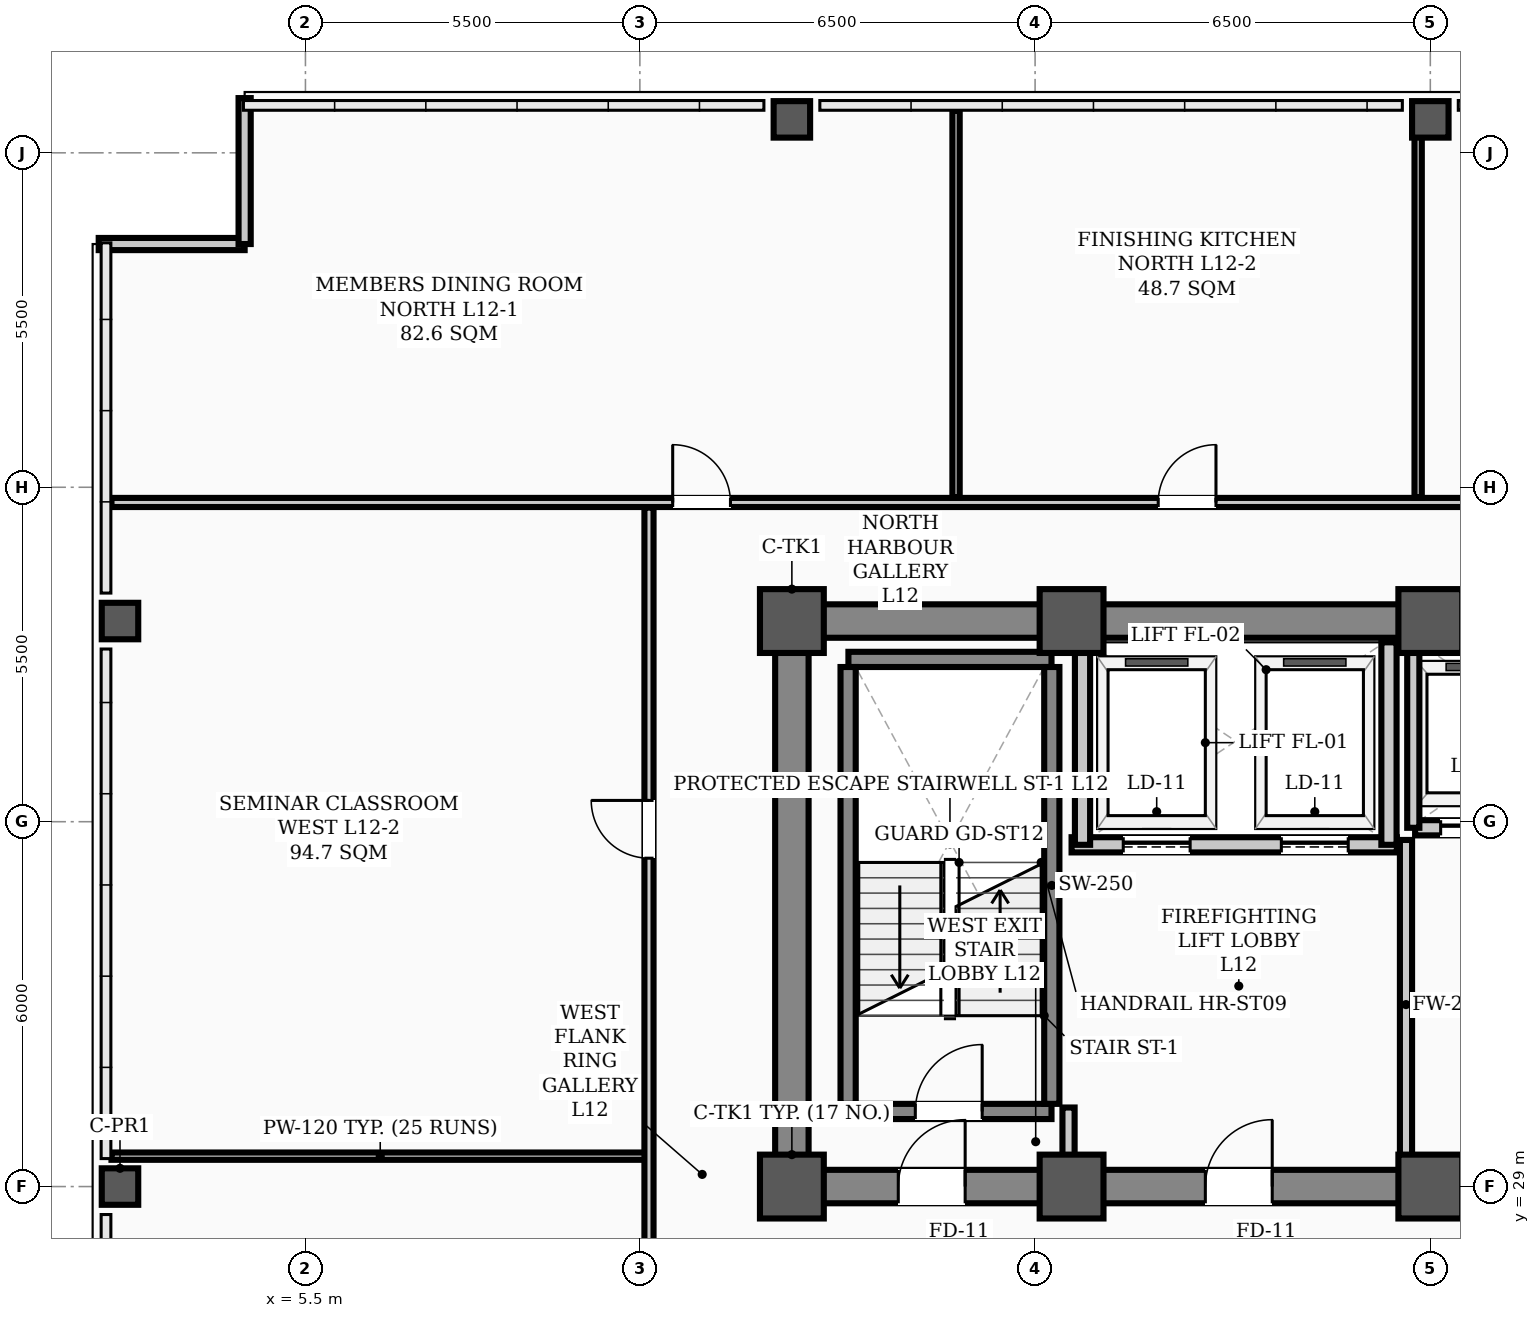
"""IFC4 building model, lengths in metres.
Left out: names, types, materials, properties, quantities, classifications, styles, units other than length and angle.
Written with IfcOpenShell. Run it as: python <this file> out.ifc"""

import sys

from ifc_helpers import new_model, si_unit, direction, frame, frame_2d, origin, origin_2d, place, context, subcontext, project, spatial, rectangle, hollow_rectangle, extrude, element, fill, save


model = new_model("IFC4")
c1 = context("Model", 3, precision=1e-05, world=origin(), true_north=direction((0.0, 1.0)))
c2 = subcontext(c1, "Body", "Model", "MODEL_VIEW")
j1 = project(units=[si_unit("LENGTHUNIT", "METRE"), si_unit("PLANEANGLEUNIT", "RADIAN")], contexts=[c1])
p1 = place(None, origin())
s1 = spatial("IfcSite", under=j1, at=p1, CompositionType="ELEMENT")
p2 = place(p1, origin())
s2 = spatial("IfcBuilding", under=s1, at=p2, CompositionType="ELEMENT")
p3 = place(p2, frame((0.0, 0.0, 49.9)))
s3 = spatial("IfcBuildingStorey", under=s2, at=p3, CompositionType="ELEMENT", Elevation=49.9)
for number, where, z_axis, x_axis in (
    (1, (13.5, 29.0, 0.0), (0.0, 0.0, 1.0), (1.0, 0.0, 0.0)),
    (2, (13.5, 38.3, 0.0), (0.0, 0.0, 1.0), (1.0, 0.0, 0.0)),
    (3, (18.1, 29.0, 0.0), (0.0, 0.0, 1.0), (1.0, 0.0, 0.0)),
    (4, (18.1, 38.3, 0.0), (0.0, 0.0, 1.0), (1.0, 0.0, 0.0)),
    (5, (24.0, 29.0, 0.0), (0.0, 0.0, 1.0), (1.0, 0.0, 0.0)),
    (6, (24.0, 38.3, 0.0), (0.0, 0.0, 1.0), (1.0, 0.0, 0.0)),
):
    element("IfcColumn", number, at=place(p3, frame(where, z_axis=z_axis, x_axis=x_axis)), inside=s3, PredefinedType="COLUMN", context=c2, shape_type="SweptSolid", body=[
        extrude(hollow_rectangle(XDim=1.05, YDim=1.05, WallThickness=0.038, InnerFilletRadius=0.019, OuterFilletRadius=0.057, at=origin_2d()), origin(), (0.0, 0.0, 1.0), 3.9),
    ])
for number, where, z_axis, x_axis in (
    (7, (2.45, 29.0, 0.0), (0.0, 0.0, 1.0), (1.0, 0.0, 0.0)),
    (8, (2.45, 38.3, 0.0), (0.0, 0.0, 1.0), (1.0, 0.0, 0.0)),
):
    element("IfcColumn", number, at=place(p3, frame(where, z_axis=z_axis, x_axis=x_axis)), inside=s3, PredefinedType="COLUMN", context=c2, shape_type="SweptSolid", body=[
        extrude(hollow_rectangle(XDim=0.6, YDim=0.6, WallThickness=0.026, InnerFilletRadius=0.013, OuterFilletRadius=0.039, at=origin_2d()), origin(), (0.0, 0.0, 1.0), 3.66),
    ])
for number, where, z_axis, x_axis in (
    (9, (13.5, 46.55, 0.0), (0.0, 0.0, 1.0), (1.0, 0.0, 0.0)),
    (10, (24.0, 46.55, 0.0), (0.0, 0.0, 1.0), (1.0, 0.0, 0.0)),
):
    element("IfcColumn", number, at=place(p3, frame(where, z_axis=z_axis, x_axis=x_axis)), inside=s3, PredefinedType="COLUMN", context=c2, shape_type="SweptSolid", body=[
        extrude(hollow_rectangle(XDim=0.6, YDim=0.6, WallThickness=0.026, InnerFilletRadius=0.013, OuterFilletRadius=0.039, at=origin_2d()), origin(), (0.0, 0.0, 1.0), 3.9),
    ])
for number, where, z_axis, x_axis in (
    (11, (2.1, 44.5, 0.0), (0.0, 0.0, 1.0), (1.0, 0.0, 0.0)),
    (12, (4.5, 44.5, 0.0), (0.0, 0.0, 1.0), (0.0, 1.0, 0.0)),
):
    element("IfcWall", number, at=place(p3, frame(where, z_axis=z_axis, x_axis=x_axis)), inside=s3, PredefinedType="PARAPET", context=c2, shape_type="SweptSolid", body=[
        extrude(rectangle(XDim=2.4, YDim=0.2, at=frame_2d((1.2, 0.0))), origin(), (0.0, 0.0, 1.0), 1.2),
    ])
p4 = place(p3, frame((13.5, 29.0, 0.0), z_axis=(0.0, 0.0, 1.0), x_axis=(1.0, 0.0, 0.0)))
e13 = element("IfcWall", 13, at=p4, inside=s3, PredefinedType="SHEAR", context=c2, shape_type="SweptSolid", body=[
    extrude(rectangle(XDim=30.5, YDim=0.55, at=frame_2d((15.25, 0.0))), origin(), (0.0, 0.0, 1.0), 3.66),
])
p5 = place(p4, frame((1.75, 0.0, 0.0)))
e14 = element("IfcOpeningElement", 14, at=p5, cuts=e13, PredefinedType="OPENING", context=c2, shape_type="SweptSolid", body=[
    extrude(rectangle(XDim=1.1, YDim=2.08, at=frame_2d((0.55, 1.04))), frame((0.0, 0.285, 0.0), z_axis=(0.0, -1.0, 0.0), x_axis=(1.0, 0.0, 0.0)), (0.0, 0.0, 1.0), 0.57),
])
p6 = place(p4, frame((26.7, 0.0, 0.0)))
e15 = element("IfcOpeningElement", 15, at=p6, cuts=e13, PredefinedType="OPENING", context=c2, shape_type="SweptSolid", body=[
    extrude(rectangle(XDim=1.1, YDim=2.08, at=frame_2d((0.55, 1.04))), frame((0.0, 0.285, 0.0), z_axis=(0.0, -1.0, 0.0), x_axis=(1.0, 0.0, 0.0)), (0.0, 0.0, 1.0), 0.57),
])
p7 = place(p4, frame((6.8, 0.0, 0.0)))
e16 = element("IfcOpeningElement", 16, at=p7, cuts=e13, PredefinedType="OPENING", context=c2, shape_type="SweptSolid", body=[
    extrude(rectangle(XDim=1.1, YDim=2.08, at=frame_2d((0.55, 1.04))), frame((0.0, 0.285, 0.0), z_axis=(0.0, -1.0, 0.0), x_axis=(1.0, 0.0, 0.0)), (0.0, 0.0, 1.0), 0.57),
])
p8 = place(p4, frame((13.2, 0.0, 0.0)))
e17 = element("IfcOpeningElement", 17, at=p8, cuts=e13, PredefinedType="OPENING", context=c2, shape_type="SweptSolid", body=[
    extrude(rectangle(XDim=1.6, YDim=2.08, at=frame_2d((0.8, 1.04))), frame((0.0, 0.285, 0.0), z_axis=(0.0, -1.0, 0.0), x_axis=(1.0, 0.0, 0.0)), (0.0, 0.0, 1.0), 0.57),
])
p9 = place(p4, frame((19.53, 0.0, 0.0)))
e18 = element("IfcOpeningElement", 18, at=p9, cuts=e13, PredefinedType="OPENING", context=c2, shape_type="SweptSolid", body=[
    extrude(rectangle(XDim=0.9, YDim=2.08, at=frame_2d((0.45, 1.04))), frame((0.0, 0.285, 0.0), z_axis=(0.0, -1.0, 0.0), x_axis=(1.0, 0.0, 0.0)), (0.0, 0.0, 1.0), 0.57),
])
p10 = place(p4, frame((21.57, 0.0, 0.0)))
e19 = element("IfcOpeningElement", 19, at=p10, cuts=e13, PredefinedType="OPENING", context=c2, shape_type="SweptSolid", body=[
    extrude(rectangle(XDim=0.9, YDim=2.08, at=frame_2d((0.45, 1.04))), frame((0.0, 0.285, 0.0), z_axis=(0.0, -1.0, 0.0), x_axis=(1.0, 0.0, 0.0)), (0.0, 0.0, 1.0), 0.57),
])
p11 = place(p3, frame((13.5, 38.3, 0.0), z_axis=(0.0, 0.0, 1.0), x_axis=(1.0, 0.0, 0.0)))
e20 = element("IfcWall", 20, at=p11, inside=s3, PredefinedType="SHEAR", context=c2, shape_type="SweptSolid", body=[
    extrude(rectangle(XDim=30.5, YDim=0.55, at=frame_2d((15.25, 0.0))), origin(), (0.0, 0.0, 1.0), 3.66),
])
p12 = place(p3, frame((13.5, 29.35, 0.0), z_axis=(0.0, 0.0, 1.0), x_axis=(0.0, 1.0, 0.0)))
e21 = element("IfcWall", 21, at=p12, inside=s3, PredefinedType="SHEAR", context=c2, shape_type="SweptSolid", body=[
    extrude(rectangle(XDim=8.6, YDim=0.55, at=frame_2d((4.3, 0.0))), origin(), (0.0, 0.0, 1.0), 3.66),
])
p13 = place(p3, frame((14.43, 30.235, 0.0), z_axis=(0.0, 0.0, 1.0), x_axis=(1.0, 0.0, 0.0)))
e22 = element("IfcWall", 22, at=p13, inside=s3, PredefinedType="STANDARD", context=c2, shape_type="SweptSolid", body=[
    extrude(rectangle(XDim=3.34, YDim=0.25, at=frame_2d((1.67, 0.0))), origin(), (0.0, 0.0, 1.0), 3.66),
])
p14 = place(p13, frame((1.1, 0.0, 0.0)))
e23 = element("IfcOpeningElement", 23, at=p14, cuts=e22, PredefinedType="OPENING", context=c2, shape_type="SweptSolid", body=[
    extrude(rectangle(XDim=1.1, YDim=2.08, at=frame_2d((0.55, 1.04))), frame((0.0, 0.135, 0.0), z_axis=(0.0, -1.0, 0.0), x_axis=(1.0, 0.0, 0.0)), (0.0, 0.0, 1.0), 0.27),
])
p15 = place(p3, frame((14.43, 37.669, 0.0), z_axis=(0.0, 0.0, 1.0), x_axis=(1.0, 0.0, 0.0)))
e24 = element("IfcWall", 24, at=p15, inside=s3, PredefinedType="STANDARD", context=c2, shape_type="SweptSolid", body=[
    extrude(rectangle(XDim=3.34, YDim=0.25, at=frame_2d((1.67, 0.0))), origin(), (0.0, 0.0, 1.0), 3.66),
])
for number, where, z_axis, x_axis in (
    (25, (14.425, 30.36, 0.0), (0.0, 0.0, 1.0), (0.0, 1.0, 0.0)),
    (26, (17.775, 30.36, 0.0), (0.0, 0.0, 1.0), (0.0, 1.0, 0.0)),
):
    element("IfcWall", number, at=place(p3, frame(where, z_axis=z_axis, x_axis=x_axis)), inside=s3, PredefinedType="STANDARD", context=c2, shape_type="SweptSolid", body=[
        extrude(rectangle(XDim=7.184, YDim=0.25, at=frame_2d((3.592, 0.0))), origin(), (0.0, 0.0, 1.0), 3.66),
    ])
p16 = place(p3, frame((18.1, 34.62, 0.0), z_axis=(0.0, 0.0, 1.0), x_axis=(1.0, 0.0, 0.0)))
e27 = element("IfcWall", 27, at=p16, inside=s3, PredefinedType="STANDARD", context=c2, shape_type="SweptSolid", body=[
    extrude(rectangle(XDim=5.35, YDim=0.25, at=frame_2d((2.675, 0.0))), origin(), (0.0, 0.0, 1.0), 3.66),
])
p17 = place(p16, frame((0.85, 0.0, 0.0)))
e28 = element("IfcOpeningElement", 28, at=p17, cuts=e27, PredefinedType="OPENING", context=c2, shape_type="SweptSolid", body=[
    extrude(rectangle(XDim=1.1, YDim=2.08, at=frame_2d((0.55, 1.04))), frame((0.0, 0.135, 0.0), z_axis=(0.0, -1.0, 0.0), x_axis=(1.0, 0.0, 0.0)), (0.0, 0.0, 1.0), 0.27),
])
p18 = place(p16, frame((3.45, 0.0, 0.0)))
e29 = element("IfcOpeningElement", 29, at=p18, cuts=e27, PredefinedType="OPENING", context=c2, shape_type="SweptSolid", body=[
    extrude(rectangle(XDim=1.1, YDim=2.08, at=frame_2d((0.55, 1.04))), frame((0.0, 0.135, 0.0), z_axis=(0.0, -1.0, 0.0), x_axis=(1.0, 0.0, 0.0)), (0.0, 0.0, 1.0), 0.27),
])
for number, where, z_axis, x_axis in (
    (30, (18.28, 34.62, 0.0), (0.0, 0.0, 1.0), (0.0, 1.0, 0.0)),
    (31, (23.32, 34.62, 0.0), (0.0, 0.0, 1.0), (0.0, 1.0, 0.0)),
):
    element("IfcWall", number, at=place(p3, frame(where, z_axis=z_axis, x_axis=x_axis)), inside=s3, PredefinedType="STANDARD", context=c2, shape_type="SweptSolid", body=[
        extrude(rectangle(XDim=3.33, YDim=0.25, at=frame_2d((1.665, 0.0))), origin(), (0.0, 0.0, 1.0), 2.24),
    ])
p19 = place(p3, frame((23.75, 34.9, 0.0), z_axis=(0.0, 0.0, 1.0), x_axis=(1.0, 0.0, 0.0)))
e32 = element("IfcWall", 32, at=p19, inside=s3, PredefinedType="STANDARD", context=c2, shape_type="SweptSolid", body=[
    extrude(rectangle(XDim=4.4, YDim=0.25, at=frame_2d((2.2, 0.0))), origin(), (0.0, 0.0, 1.0), 3.66),
])
p20 = place(p19, frame((0.42, 0.0, 0.0)))
e33 = element("IfcOpeningElement", 33, at=p20, cuts=e32, PredefinedType="OPENING", context=c2, shape_type="SweptSolid", body=[
    extrude(rectangle(XDim=1.3, YDim=2.08, at=frame_2d((0.65, 1.04))), frame((0.0, 0.135, 0.0), z_axis=(0.0, -1.0, 0.0), x_axis=(1.0, 0.0, 0.0)), (0.0, 0.0, 1.0), 0.27),
])
p21 = place(p19, frame((2.68, 0.0, 0.0)))
e34 = element("IfcOpeningElement", 34, at=p21, cuts=e32, PredefinedType="OPENING", context=c2, shape_type="SweptSolid", body=[
    extrude(rectangle(XDim=1.3, YDim=2.08, at=frame_2d((0.65, 1.04))), frame((0.0, 0.135, 0.0), z_axis=(0.0, -1.0, 0.0), x_axis=(1.0, 0.0, 0.0)), (0.0, 0.0, 1.0), 0.27),
])
p22 = place(p3, frame((2.31, 29.5, 0.0), z_axis=(0.0, 0.0, 1.0), x_axis=(1.0, 0.0, 0.0)))
e35 = element("IfcWall", 35, at=p22, inside=s3, PredefinedType="PARTITIONING", context=c2, shape_type="SweptSolid", body=[
    extrude(rectangle(XDim=8.84, YDim=0.12, at=frame_2d((4.42, 0.0))), origin(), (0.0, 0.0, 1.0), 2.24),
])
p23 = place(p3, frame((2.31, 40.25, 0.0), z_axis=(0.0, 0.0, 1.0), x_axis=(1.0, 0.0, 0.0)))
e36 = element("IfcWall", 36, at=p23, inside=s3, PredefinedType="PARTITIONING", context=c2, shape_type="SweptSolid", body=[
    extrude(rectangle(XDim=49.38, YDim=0.15, at=frame_2d((24.69, 0.0))), origin(), (0.0, 0.0, 1.0), 2.24),
])
p24 = place(p23, frame((9.23, 0.0, 0.0)))
e37 = element("IfcOpeningElement", 37, at=p24, cuts=e36, PredefinedType="OPENING", context=c2, shape_type="SweptSolid", body=[
    extrude(rectangle(XDim=0.95, YDim=2.08, at=frame_2d((0.475, 1.04))), frame((0.0, 0.085, 0.0), z_axis=(0.0, -1.0, 0.0), x_axis=(1.0, 0.0, 0.0)), (0.0, 0.0, 1.0), 0.17),
])
p25 = place(p23, frame((17.215, 0.0, 0.0)))
e38 = element("IfcOpeningElement", 38, at=p25, cuts=e36, PredefinedType="OPENING", context=c2, shape_type="SweptSolid", body=[
    extrude(rectangle(XDim=0.95, YDim=2.08, at=frame_2d((0.475, 1.04))), frame((0.0, 0.085, 0.0), z_axis=(0.0, -1.0, 0.0), x_axis=(1.0, 0.0, 0.0)), (0.0, 0.0, 1.0), 0.17),
])
p26 = place(p23, frame((24.915, 0.0, 0.0)))
e39 = element("IfcOpeningElement", 39, at=p26, cuts=e36, PredefinedType="OPENING", context=c2, shape_type="SweptSolid", body=[
    extrude(rectangle(XDim=0.95, YDim=2.08, at=frame_2d((0.475, 1.04))), frame((0.0, 0.085, 0.0), z_axis=(0.0, -1.0, 0.0), x_axis=(1.0, 0.0, 0.0)), (0.0, 0.0, 1.0), 0.17),
])
p27 = place(p23, frame((32.815, 0.0, 0.0)))
e40 = element("IfcOpeningElement", 40, at=p27, cuts=e36, PredefinedType="OPENING", context=c2, shape_type="SweptSolid", body=[
    extrude(rectangle(XDim=0.95, YDim=2.08, at=frame_2d((0.475, 1.04))), frame((0.0, 0.085, 0.0), z_axis=(0.0, -1.0, 0.0), x_axis=(1.0, 0.0, 0.0)), (0.0, 0.0, 1.0), 0.17),
])
p28 = place(p23, frame((42.7, 0.0, 0.0)))
e41 = element("IfcOpeningElement", 41, at=p28, cuts=e36, PredefinedType="OPENING", context=c2, shape_type="SweptSolid", body=[
    extrude(rectangle(XDim=0.95, YDim=2.08, at=frame_2d((0.475, 1.04))), frame((0.0, 0.085, 0.0), z_axis=(0.0, -1.0, 0.0), x_axis=(1.0, 0.0, 0.0)), (0.0, 0.0, 1.0), 0.17),
])
p29 = place(p3, frame((18.05, 29.285, 0.0), z_axis=(0.0, 0.0, 1.0), x_axis=(0.0, 1.0, 0.0)))
e42 = element("IfcWall", 42, at=p29, inside=s3, PredefinedType="STANDARD", context=c2, shape_type="SweptSolid", body=[
    extrude(rectangle(XDim=1.015, YDim=0.2, at=frame_2d((0.508, 0.0))), origin(), (0.0, 0.0, 1.0), 2.24),
])
p30 = place(p3, frame((23.6, 29.285, 0.0), z_axis=(0.0, 0.0, 1.0), x_axis=(0.0, 1.0, 0.0)))
e43 = element("IfcWall", 43, at=p30, inside=s3, PredefinedType="STANDARD", context=c2, shape_type="SweptSolid", body=[
    extrude(rectangle(XDim=5.415, YDim=0.2, at=frame_2d((2.708, 0.0))), origin(), (0.0, 0.0, 1.0), 2.24),
])
p31 = place(p3, frame((11.15, 17.635, 0.0), z_axis=(0.0, 0.0, 1.0), x_axis=(0.0, 1.0, 0.0)))
e44 = element("IfcWall", 44, at=p31, inside=s3, PredefinedType="PARTITIONING", context=c2, shape_type="SweptSolid", body=[
    extrude(rectangle(XDim=22.53, YDim=0.15, at=frame_2d((11.265, 0.0))), origin(), (0.0, 0.0, 1.0), 2.24),
])
p32 = place(p31, frame((5.415, 0.0, 0.0)))
e45 = element("IfcOpeningElement", 45, at=p32, cuts=e44, PredefinedType="OPENING", context=c2, shape_type="SweptSolid", body=[
    extrude(rectangle(XDim=0.95, YDim=2.08, at=frame_2d((0.475, 1.04))), frame((0.0, 0.085, 0.0), z_axis=(0.0, -1.0, 0.0), x_axis=(1.0, 0.0, 0.0)), (0.0, 0.0, 1.0), 0.17),
])
p33 = place(p31, frame((16.765, 0.0, 0.0)))
e46 = element("IfcOpeningElement", 46, at=p33, cuts=e44, PredefinedType="OPENING", context=c2, shape_type="SweptSolid", body=[
    extrude(rectangle(XDim=0.95, YDim=2.08, at=frame_2d((0.475, 1.04))), frame((0.0, 0.085, 0.0), z_axis=(0.0, -1.0, 0.0), x_axis=(1.0, 0.0, 0.0)), (0.0, 0.0, 1.0), 0.17),
])
for number, where, z_axis, x_axis in (
    (47, (16.2, 40.335, 0.0), (0.0, 0.0, 1.0), (0.0, 1.0, 0.0)),
    (48, (23.8, 40.335, 0.0), (0.0, 0.0, 1.0), (0.0, 1.0, 0.0)),
):
    element("IfcWall", number, at=place(p3, frame(where, z_axis=z_axis, x_axis=x_axis)), inside=s3, PredefinedType="PARTITIONING", context=c2, shape_type="SweptSolid", body=[
        extrude(rectangle(XDim=6.355, YDim=0.12, at=frame_2d((3.177, 0.0))), origin(), (0.0, 0.0, 1.0), 2.24),
    ])
p34 = place(p3, frame((23.72, 34.9, 0.0), z_axis=(0.0, 0.0, 1.0), x_axis=(0.0, 1.0, 0.0)))
e49 = element("IfcWall", 49, at=p34, inside=s3, PredefinedType="STANDARD", context=c2, shape_type="SweptSolid", body=[
    extrude(rectangle(XDim=3.12, YDim=0.2, at=frame_2d((1.56, 0.0))), origin(), (0.0, 0.0, 1.0), 2.24),
])
p35 = place(p14, origin())
e50 = element("IfcDoor", 50, at=p35, inside=s3, OperationType="SINGLE_SWING_RIGHT", PredefinedType="DOOR", context=c2, shape_type="SweptSolid", body=[
    extrude(rectangle(XDim=1.1, YDim=2.08, at=frame_2d((0.55, 1.04))), frame((0.0, 0.025, 0.0), z_axis=(0.0, -1.0, 0.0), x_axis=(1.0, 0.0, 0.0)), (0.0, 0.0, 1.0), 0.05),
])
fill(e23, e50)
p36 = place(p5, origin())
e51 = element("IfcDoor", 51, at=p36, inside=s3, OperationType="SINGLE_SWING_RIGHT", PredefinedType="DOOR", context=c2, shape_type="SweptSolid", body=[
    extrude(rectangle(XDim=1.1, YDim=2.08, at=frame_2d((0.55, 1.04))), frame((0.0, 0.025, 0.0), z_axis=(0.0, -1.0, 0.0), x_axis=(1.0, 0.0, 0.0)), (0.0, 0.0, 1.0), 0.05),
])
fill(e14, e51)
p37 = place(p7, origin())
e52 = element("IfcDoor", 52, at=p37, inside=s3, OperationType="SINGLE_SWING_RIGHT", PredefinedType="DOOR", context=c2, shape_type="SweptSolid", body=[
    extrude(rectangle(XDim=1.1, YDim=2.08, at=frame_2d((0.55, 1.04))), frame((0.0, 0.025, 0.0), z_axis=(0.0, -1.0, 0.0), x_axis=(1.0, 0.0, 0.0)), (0.0, 0.0, 1.0), 0.05),
])
fill(e16, e52)
p38 = place(p33, origin())
e53 = element("IfcDoor", 53, at=p38, inside=s3, OperationType="SINGLE_SWING_RIGHT", PredefinedType="DOOR", context=c2, shape_type="SweptSolid", body=[
    extrude(rectangle(XDim=0.95, YDim=2.08, at=frame_2d((0.475, 1.04))), frame((0.0, 0.025, 0.0), z_axis=(0.0, -1.0, 0.0), x_axis=(1.0, 0.0, 0.0)), (0.0, 0.0, 1.0), 0.05),
])
fill(e46, e53)
p39 = place(p24, origin())
e54 = element("IfcDoor", 54, at=p39, inside=s3, OperationType="SINGLE_SWING_LEFT", PredefinedType="DOOR", context=c2, shape_type="SweptSolid", body=[
    extrude(rectangle(XDim=0.95, YDim=2.08, at=frame_2d((0.475, 1.04))), frame((0.0, 0.025, 0.0), z_axis=(0.0, -1.0, 0.0), x_axis=(1.0, 0.0, 0.0)), (0.0, 0.0, 1.0), 0.05),
])
fill(e37, e54)
p40 = place(p25, origin())
e55 = element("IfcDoor", 55, at=p40, inside=s3, OperationType="SINGLE_SWING_RIGHT", PredefinedType="DOOR", context=c2, shape_type="SweptSolid", body=[
    extrude(rectangle(XDim=0.95, YDim=2.08, at=frame_2d((0.475, 1.04))), frame((0.0, 0.025, 0.0), z_axis=(0.0, -1.0, 0.0), x_axis=(1.0, 0.0, 0.0)), (0.0, 0.0, 1.0), 0.05),
])
fill(e38, e55)
p41 = place(p17, origin())
e56 = element("IfcDoor", 56, at=p41, inside=s3, OperationType="SLIDING_TO_LEFT", PredefinedType="DOOR", context=c2, shape_type="SweptSolid", body=[
    extrude(rectangle(XDim=1.1, YDim=2.08, at=frame_2d((0.55, 1.04))), frame((0.0, 0.025, 0.0), z_axis=(0.0, -1.0, 0.0), x_axis=(1.0, 0.0, 0.0)), (0.0, 0.0, 1.0), 0.05),
])
fill(e28, e56)
p42 = place(p18, origin())
e57 = element("IfcDoor", 57, at=p42, inside=s3, OperationType="SLIDING_TO_LEFT", PredefinedType="DOOR", context=c2, shape_type="SweptSolid", body=[
    extrude(rectangle(XDim=1.1, YDim=2.08, at=frame_2d((0.55, 1.04))), frame((0.0, 0.025, 0.0), z_axis=(0.0, -1.0, 0.0), x_axis=(1.0, 0.0, 0.0)), (0.0, 0.0, 1.0), 0.05),
])
fill(e29, e57)
p43 = place(p20, origin())
e58 = element("IfcDoor", 58, at=p43, inside=s3, OperationType="DOUBLE_DOOR_SLIDING", PredefinedType="DOOR", context=c2, shape_type="SweptSolid", body=[
    extrude(rectangle(XDim=1.3, YDim=2.08, at=frame_2d((0.65, 1.04))), frame((0.0, 0.025, 0.0), z_axis=(0.0, -1.0, 0.0), x_axis=(1.0, 0.0, 0.0)), (0.0, 0.0, 1.0), 0.05),
])
fill(e33, e58)
save(model, sys.argv[1])
